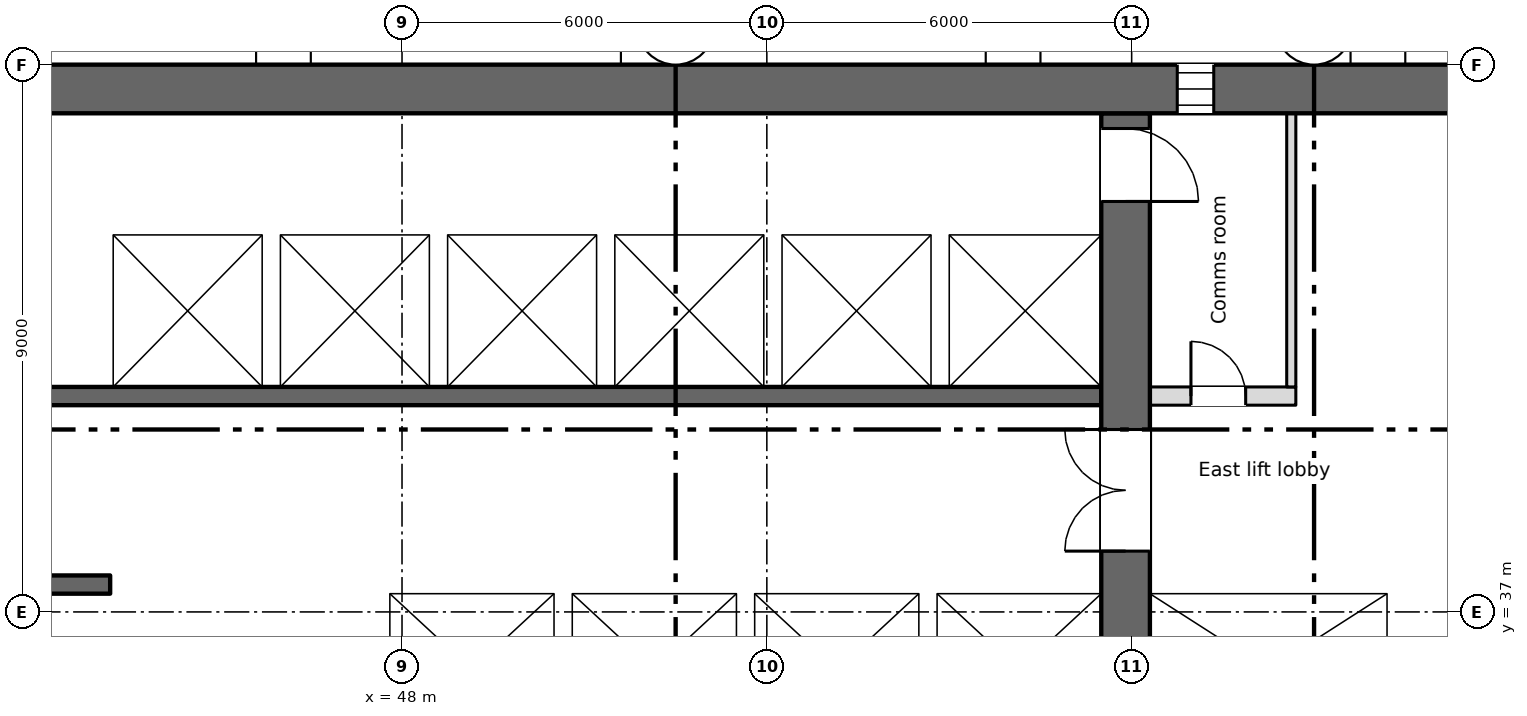
"""IFC4 building model, lengths in metres.
Left out: names, types, materials, properties, quantities, classifications, styles, units other than length and angle.
Written with IfcOpenShell. Run it as: python <this file> out.ifc"""

import sys

from ifc_helpers import new_model, si_unit, direction, frame, frame_2d, origin, place, context, subcontext, project, spatial, rectangle, extrude, element, fill, save


model = new_model("IFC4")
c1 = context("Model", 3, precision=1e-05, world=origin(), true_north=direction((0.0, 1.0)))
c2 = subcontext(c1, "Body", "Model", "MODEL_VIEW")
j1 = project(units=[si_unit("LENGTHUNIT", "METRE"), si_unit("PLANEANGLEUNIT", "RADIAN")], contexts=[c1])
p1 = place(None, origin())
s1 = spatial("IfcSite", under=j1, at=p1, CompositionType="ELEMENT")
p2 = place(p1, origin())
s2 = spatial("IfcBuilding", under=s1, at=p2, CompositionType="ELEMENT")
p3 = place(p2, frame((0.0, 0.0, 95.0)))
s3 = spatial("IfcBuildingStorey", under=s2, at=p3, CompositionType="ELEMENT", Elevation=95.0)
p4 = place(p3, frame((5.55, 45.6, 0.0), z_axis=(0.0, 0.0, 1.0), x_axis=(1.0, 0.0, 0.0)))
e1 = element("IfcWall", 1, at=p4, inside=s3, PredefinedType="SHEAR", context=c2, shape_type="SweptSolid", body=[
    extrude(rectangle(XDim=60.9, YDim=0.8, at=frame_2d((30.45, 0.0))), origin(), (0.0, 0.0, 1.0), 3.35),
])
p5 = place(p4, frame((1.2, 0.0, 0.6)))
e2 = element("IfcOpeningElement", 2, at=p5, cuts=e1, PredefinedType="OPENING", context=c2, shape_type="SweptSolid", body=[
    extrude(rectangle(XDim=0.6, YDim=2.4, at=frame_2d((0.3, 1.2))), frame((0.0, 0.41, 0.0), z_axis=(0.0, -1.0, 0.0), x_axis=(1.0, 0.0, 0.0)), (0.0, 0.0, 1.0), 0.82),
])
p6 = place(p4, frame((7.2, 0.0, 0.6)))
e3 = element("IfcOpeningElement", 3, at=p6, cuts=e1, PredefinedType="OPENING", context=c2, shape_type="SweptSolid", body=[
    extrude(rectangle(XDim=0.6, YDim=2.4, at=frame_2d((0.3, 1.2))), frame((0.0, 0.41, 0.0), z_axis=(0.0, -1.0, 0.0), x_axis=(1.0, 0.0, 0.0)), (0.0, 0.0, 1.0), 0.82),
])
p7 = place(p4, frame((55.2, 0.0, 0.6)))
e4 = element("IfcOpeningElement", 4, at=p7, cuts=e1, PredefinedType="OPENING", context=c2, shape_type="SweptSolid", body=[
    extrude(rectangle(XDim=0.6, YDim=2.4, at=frame_2d((0.3, 1.2))), frame((0.0, 0.41, 0.0), z_axis=(0.0, -1.0, 0.0), x_axis=(1.0, 0.0, 0.0)), (0.0, 0.0, 1.0), 0.82),
])
p8 = place(p3, frame((64.35, 34.8, 0.0), z_axis=(0.0, 0.0, 1.0), x_axis=(0.0, 1.0, 0.0)))
e5 = element("IfcWall", 5, at=p8, inside=s3, PredefinedType="SHEAR", context=c2, shape_type="SweptSolid", body=[
    extrude(rectangle(XDim=10.4, YDim=0.3, at=frame_2d((5.2, 0.0))), origin(), (0.0, 0.0, 1.0), 3.35),
])
p9 = place(p3, frame((59.9, 28.4, 0.0), z_axis=(0.0, 0.0, 1.0), x_axis=(0.0, 1.0, 0.0)))
e6 = element("IfcWall", 6, at=p9, inside=s3, PredefinedType="SHEAR", context=c2, shape_type="SweptSolid", body=[
    extrude(rectangle(XDim=16.8, YDim=0.8, at=frame_2d((8.4, 0.0))), origin(), (0.0, 0.0, 1.0), 3.35),
])
p10 = place(p9, frame((9.6, 0.0, 0.0)))
e7 = element("IfcOpeningElement", 7, at=p10, cuts=e6, PredefinedType="OPENING", context=c2, shape_type="SweptSolid", body=[
    extrude(rectangle(XDim=2.0, YDim=2.1, at=frame_2d((1.0, 1.05))), frame((0.0, 0.41, 0.0), z_axis=(0.0, -1.0, 0.0), x_axis=(1.0, 0.0, 0.0)), (0.0, 0.0, 1.0), 0.82),
])
p11 = place(p9, frame((15.35, 0.0, 0.0)))
e8 = element("IfcOpeningElement", 8, at=p11, cuts=e6, PredefinedType="OPENING", context=c2, shape_type="SweptSolid", body=[
    extrude(rectangle(XDim=1.2, YDim=2.1, at=frame_2d((0.6, 1.05))), frame((0.0, 0.41, 0.0), z_axis=(0.0, -1.0, 0.0), x_axis=(1.0, 0.0, 0.0)), (0.0, 0.0, 1.0), 0.82),
])
p12 = place(p3, frame((43.2, 37.45, 0.0), z_axis=(0.0, 0.0, 1.0), x_axis=(-1.0, 0.0, 0.0)))
e9 = element("IfcWall", 9, at=p12, inside=s3, PredefinedType="SHEAR", context=c2, shape_type="SweptSolid", body=[
    extrude(rectangle(XDim=8.4, YDim=0.3, at=frame_2d((4.2, 0.0))), origin(), (0.0, 0.0, 1.0), 3.35),
])
p13 = place(p12, frame((3.75, 0.0, 0.0)))
e10 = element("IfcOpeningElement", 10, at=p13, cuts=e9, PredefinedType="OPENING", context=c2, shape_type="SweptSolid", body=[
    extrude(rectangle(XDim=0.9, YDim=2.1, at=frame_2d((0.45, 1.05))), frame((0.0, 0.16, 0.0), z_axis=(0.0, -1.0, 0.0), x_axis=(1.0, 0.0, 0.0)), (0.0, 0.0, 1.0), 0.32),
])
p14 = place(p3, frame((47.3, 37.45, 0.0), z_axis=(0.0, 0.0, 1.0), x_axis=(1.0, 0.0, 0.0)))
e11 = element("IfcWall", 11, at=p14, inside=s3, PredefinedType="SHEAR", context=c2, shape_type="SweptSolid", body=[
    extrude(rectangle(XDim=12.2, YDim=0.3, at=frame_2d((6.1, 0.0))), origin(), (0.0, 0.0, 1.0), 3.35),
])
p15 = place(p14, frame((4.3, 0.0, 0.0)))
e12 = element("IfcOpeningElement", 12, at=p15, cuts=e11, PredefinedType="OPENING", context=c2, shape_type="SweptSolid", body=[
    extrude(rectangle(XDim=1.1, YDim=2.1, at=frame_2d((0.55, 1.05))), frame((0.0, 0.16, 0.0), z_axis=(0.0, -1.0, 0.0), x_axis=(1.0, 0.0, 0.0)), (0.0, 0.0, 1.0), 0.32),
])
p16 = place(p14, frame((7.3, 0.0, 0.0)))
e13 = element("IfcOpeningElement", 13, at=p16, cuts=e11, PredefinedType="OPENING", context=c2, shape_type="SweptSolid", body=[
    extrude(rectangle(XDim=1.1, YDim=2.1, at=frame_2d((0.55, 1.05))), frame((0.0, 0.16, 0.0), z_axis=(0.0, -1.0, 0.0), x_axis=(1.0, 0.0, 0.0)), (0.0, 0.0, 1.0), 0.32),
])
p17 = place(p14, frame((10.3, 0.0, 0.0)))
e14 = element("IfcOpeningElement", 14, at=p17, cuts=e11, PredefinedType="OPENING", context=c2, shape_type="SweptSolid", body=[
    extrude(rectangle(XDim=1.1, YDim=2.1, at=frame_2d((0.55, 1.05))), frame((0.0, 0.16, 0.0), z_axis=(0.0, -1.0, 0.0), x_axis=(1.0, 0.0, 0.0)), (0.0, 0.0, 1.0), 0.32),
])
p18 = place(p3, frame((60.3, 37.45, 0.0), z_axis=(0.0, 0.0, 1.0), x_axis=(1.0, 0.0, 0.0)))
e15 = element("IfcWall", 15, at=p18, inside=s3, PredefinedType="SHEAR", context=c2, shape_type="SweptSolid", body=[
    extrude(rectangle(XDim=3.9, YDim=0.3, at=frame_2d((1.95, 0.0))), origin(), (0.0, 0.0, 1.0), 3.35),
])
p19 = place(p18, frame((1.4, 0.0, 0.0)))
e16 = element("IfcOpeningElement", 16, at=p19, cuts=e15, PredefinedType="OPENING", context=c2, shape_type="SweptSolid", body=[
    extrude(rectangle(XDim=1.1, YDim=2.1, at=frame_2d((0.55, 1.05))), frame((0.0, 0.16, 0.0), z_axis=(0.0, -1.0, 0.0), x_axis=(1.0, 0.0, 0.0)), (0.0, 0.0, 1.0), 0.32),
])
p20 = place(p3, frame((43.05, 34.8, 0.0), z_axis=(0.0, 0.0, 1.0), x_axis=(0.0, 1.0, 0.0)))
e17 = element("IfcWall", 17, at=p20, inside=s3, PredefinedType="SHEAR", context=c2, shape_type="SweptSolid", body=[
    extrude(rectangle(XDim=2.5, YDim=0.3, at=frame_2d((1.25, 0.0))), origin(), (0.0, 0.0, 1.0), 3.35),
])
p21 = place(p3, frame((47.55, 34.8, 0.0), z_axis=(0.0, 0.0, 1.0), x_axis=(0.0, 1.0, 0.0)))
e18 = element("IfcWall", 18, at=p21, inside=s3, PredefinedType="SHEAR", context=c2, shape_type="SweptSolid", body=[
    extrude(rectangle(XDim=2.5, YDim=0.5, at=frame_2d((1.25, 0.0))), origin(), (0.0, 0.0, 1.0), 3.35),
])
p22 = place(p3, frame((50.65, 34.8, 0.0), z_axis=(0.0, 0.0, 1.0), x_axis=(0.0, 1.0, 0.0)))
e19 = element("IfcWall", 19, at=p22, inside=s3, PredefinedType="SHEAR", context=c2, shape_type="SweptSolid", body=[
    extrude(rectangle(XDim=2.5, YDim=0.3, at=frame_2d((1.25, 0.0))), origin(), (0.0, 0.0, 1.0), 3.35),
])
p23 = place(p3, frame((18.5, 40.55, 0.0), z_axis=(0.0, 0.0, 1.0), x_axis=(1.0, 0.0, 0.0)))
e20 = element("IfcWall", 20, at=p23, inside=s3, PredefinedType="SHEAR", context=c2, shape_type="SweptSolid", body=[
    extrude(rectangle(XDim=41.0, YDim=0.3, at=frame_2d((20.5, 0.0))), origin(), (0.0, 0.0, 1.0), 3.35),
])
p24 = place(p23, frame((15.9, 0.0, 0.0)))
e21 = element("IfcOpeningElement", 21, at=p24, cuts=e20, PredefinedType="OPENING", context=c2, shape_type="SweptSolid", body=[
    extrude(rectangle(XDim=0.9, YDim=2.1, at=frame_2d((0.45, 1.05))), frame((0.0, 0.16, 0.0), z_axis=(0.0, -1.0, 0.0), x_axis=(1.0, 0.0, 0.0)), (0.0, 0.0, 1.0), 0.32),
])
p25 = place(p23, frame((21.4, 0.0, 0.0)))
e22 = element("IfcOpeningElement", 22, at=p25, cuts=e20, PredefinedType="OPENING", context=c2, shape_type="SweptSolid", body=[
    extrude(rectangle(XDim=0.9, YDim=2.1, at=frame_2d((0.45, 1.05))), frame((0.0, 0.16, 0.0), z_axis=(0.0, -1.0, 0.0), x_axis=(1.0, 0.0, 0.0)), (0.0, 0.0, 1.0), 0.32),
])
p26 = place(p23, frame((6.175, 0.0, 0.0)))
e23 = element("IfcOpeningElement", 23, at=p26, cuts=e20, PredefinedType="OPENING", context=c2, shape_type="SweptSolid", body=[
    extrude(rectangle(XDim=1.1, YDim=2.1, at=frame_2d((0.55, 1.05))), frame((0.0, 0.16, 0.0), z_axis=(0.0, -1.0, 0.0), x_axis=(1.0, 0.0, 0.0)), (0.0, 0.0, 1.0), 0.32),
])
p27 = place(p23, frame((8.925, 0.0, 0.0)))
e24 = element("IfcOpeningElement", 24, at=p27, cuts=e20, PredefinedType="OPENING", context=c2, shape_type="SweptSolid", body=[
    extrude(rectangle(XDim=1.1, YDim=2.1, at=frame_2d((0.55, 1.05))), frame((0.0, 0.16, 0.0), z_axis=(0.0, -1.0, 0.0), x_axis=(1.0, 0.0, 0.0)), (0.0, 0.0, 1.0), 0.32),
])
p28 = place(p23, frame((11.675, 0.0, 0.0)))
e25 = element("IfcOpeningElement", 25, at=p28, cuts=e20, PredefinedType="OPENING", context=c2, shape_type="SweptSolid", body=[
    extrude(rectangle(XDim=1.1, YDim=2.1, at=frame_2d((0.55, 1.05))), frame((0.0, 0.16, 0.0), z_axis=(0.0, -1.0, 0.0), x_axis=(1.0, 0.0, 0.0)), (0.0, 0.0, 1.0), 0.32),
])
p29 = place(p23, frame((30.925, 0.0, 0.0)))
e26 = element("IfcOpeningElement", 26, at=p29, cuts=e20, PredefinedType="OPENING", context=c2, shape_type="SweptSolid", body=[
    extrude(rectangle(XDim=1.1, YDim=2.1, at=frame_2d((0.55, 1.05))), frame((0.0, 0.16, 0.0), z_axis=(0.0, -1.0, 0.0), x_axis=(1.0, 0.0, 0.0)), (0.0, 0.0, 1.0), 0.32),
])
p30 = place(p23, frame((33.675, 0.0, 0.0)))
e27 = element("IfcOpeningElement", 27, at=p30, cuts=e20, PredefinedType="OPENING", context=c2, shape_type="SweptSolid", body=[
    extrude(rectangle(XDim=1.1, YDim=2.1, at=frame_2d((0.55, 1.05))), frame((0.0, 0.16, 0.0), z_axis=(0.0, -1.0, 0.0), x_axis=(1.0, 0.0, 0.0)), (0.0, 0.0, 1.0), 0.32),
])
p31 = place(p23, frame((36.375, 0.0, 0.0)))
e28 = element("IfcOpeningElement", 28, at=p31, cuts=e20, PredefinedType="OPENING", context=c2, shape_type="SweptSolid", body=[
    extrude(rectangle(XDim=1.2, YDim=2.1, at=frame_2d((0.6, 1.05))), frame((0.0, 0.16, 0.0), z_axis=(0.0, -1.0, 0.0), x_axis=(1.0, 0.0, 0.0)), (0.0, 0.0, 1.0), 0.32),
])
p32 = place(p23, frame((39.15, 0.0, 0.0)))
e29 = element("IfcOpeningElement", 29, at=p32, cuts=e20, PredefinedType="OPENING", context=c2, shape_type="SweptSolid", body=[
    extrude(rectangle(XDim=1.2, YDim=2.1, at=frame_2d((0.6, 1.05))), frame((0.0, 0.16, 0.0), z_axis=(0.0, -1.0, 0.0), x_axis=(1.0, 0.0, 0.0)), (0.0, 0.0, 1.0), 0.32),
])
p33 = place(p3, frame((18.5, 43.35, 0.0), z_axis=(0.0, 0.0, 1.0), x_axis=(1.0, 0.0, 0.0)))
e30 = element("IfcWall", 30, at=p33, inside=s3, PredefinedType="SHEAR", context=c2, shape_type="SweptSolid", body=[
    extrude(rectangle(XDim=41.0, YDim=0.3, at=frame_2d((20.5, 0.0))), origin(), (0.0, 0.0, 1.0), 3.35),
])
p34 = place(p3, frame((60.3, 40.55, 0.0), z_axis=(0.0, 0.0, 1.0), x_axis=(1.0, 0.0, 0.0)))
e31 = element("IfcWall", 31, at=p34, inside=s3, PredefinedType="PARTITIONING", context=c2, shape_type="SweptSolid", body=[
    extrude(rectangle(XDim=2.4, YDim=0.3, at=frame_2d((1.2, 0.0))), origin(), (0.0, 0.0, 1.0), 3.35),
])
p35 = place(p34, frame((0.675, 0.0, 0.0)))
e32 = element("IfcOpeningElement", 32, at=p35, cuts=e31, PredefinedType="OPENING", context=c2, shape_type="SweptSolid", body=[
    extrude(rectangle(XDim=0.9, YDim=2.1, at=frame_2d((0.45, 1.05))), frame((0.0, 0.16, 0.0), z_axis=(0.0, -1.0, 0.0), x_axis=(1.0, 0.0, 0.0)), (0.0, 0.0, 1.0), 0.32),
])
for number, where, z_axis, x_axis in (
    (33, (53.65, 34.8, 0.0), (0.0, 0.0, 1.0), (0.0, 1.0, 0.0)),
    (34, (56.65, 34.8, 0.0), (0.0, 0.0, 1.0), (0.0, 1.0, 0.0)),
    (35, (43.1, 40.7, 0.0), (0.0, 0.0, 1.0), (0.0, 1.0, 0.0)),
    (36, (45.85, 40.7, 0.0), (0.0, 0.0, 1.0), (0.0, 1.0, 0.0)),
    (37, (48.6, 40.7, 0.0), (0.0, 0.0, 1.0), (0.0, 1.0, 0.0)),
    (38, (51.35, 40.7, 0.0), (0.0, 0.0, 1.0), (0.0, 1.0, 0.0)),
    (39, (54.1, 40.7, 0.0), (0.0, 0.0, 1.0), (0.0, 1.0, 0.0)),
    (40, (56.85, 40.7, 0.0), (0.0, 0.0, 1.0), (0.0, 1.0, 0.0)),
):
    element("IfcWall", number, at=place(p3, frame(where, z_axis=z_axis, x_axis=x_axis)), inside=s3, PredefinedType="SHEAR", context=c2, shape_type="SweptSolid", body=[
        extrude(rectangle(XDim=2.5, YDim=0.3, at=frame_2d((1.25, 0.0))), origin(), (0.0, 0.0, 1.0), 3.35),
    ])
p36 = place(p3, frame((62.625, 40.7, 0.0), z_axis=(0.0, 0.0, 1.0), x_axis=(0.0, 1.0, 0.0)))
e41 = element("IfcWall", 41, at=p36, inside=s3, PredefinedType="PARTITIONING", context=c2, shape_type="SweptSolid", body=[
    extrude(rectangle(XDim=4.5, YDim=0.15, at=frame_2d((2.25, 0.0))), origin(), (0.0, 0.0, 1.0), 3.35),
])
p37 = place(p7, origin())
e42 = element("IfcWindow", 42, at=p37, inside=s3, PartitioningType="SINGLE_PANEL", PredefinedType="WINDOW", context=c2, shape_type="SweptSolid", body=[
    extrude(rectangle(XDim=0.6, YDim=2.4, at=frame_2d((0.3, 1.2))), frame((0.0, 0.03, 0.0), z_axis=(0.0, -1.0, 0.0), x_axis=(1.0, 0.0, 0.0)), (0.0, 0.0, 1.0), 0.06),
])
fill(e4, e42)
p38 = place(p35, origin())
e43 = element("IfcDoor", 43, at=p38, inside=s3, OperationType="SINGLE_SWING_LEFT", PredefinedType="DOOR", context=c2, shape_type="SweptSolid", body=[
    extrude(rectangle(XDim=0.9, YDim=2.1, at=frame_2d((0.45, 1.05))), frame((0.0, 0.025, 0.0), z_axis=(0.0, -1.0, 0.0), x_axis=(1.0, 0.0, 0.0)), (0.0, 0.0, 1.0), 0.05),
])
fill(e32, e43)
p39 = place(p15, origin())
e44 = element("IfcDoor", 44, at=p39, inside=s3, OperationType="SLIDING_TO_LEFT", PredefinedType="DOOR", context=c2, shape_type="SweptSolid", body=[
    extrude(rectangle(XDim=1.1, YDim=2.1, at=frame_2d((0.55, 1.05))), frame((0.0, 0.025, 0.0), z_axis=(0.0, -1.0, 0.0), x_axis=(1.0, 0.0, 0.0)), (0.0, 0.0, 1.0), 0.05),
])
fill(e12, e44)
p40 = place(p16, origin())
e45 = element("IfcDoor", 45, at=p40, inside=s3, OperationType="SLIDING_TO_LEFT", PredefinedType="DOOR", context=c2, shape_type="SweptSolid", body=[
    extrude(rectangle(XDim=1.1, YDim=2.1, at=frame_2d((0.55, 1.05))), frame((0.0, 0.025, 0.0), z_axis=(0.0, -1.0, 0.0), x_axis=(1.0, 0.0, 0.0)), (0.0, 0.0, 1.0), 0.05),
])
fill(e13, e45)
p41 = place(p17, origin())
e46 = element("IfcDoor", 46, at=p41, inside=s3, OperationType="SLIDING_TO_LEFT", PredefinedType="DOOR", context=c2, shape_type="SweptSolid", body=[
    extrude(rectangle(XDim=1.1, YDim=2.1, at=frame_2d((0.55, 1.05))), frame((0.0, 0.025, 0.0), z_axis=(0.0, -1.0, 0.0), x_axis=(1.0, 0.0, 0.0)), (0.0, 0.0, 1.0), 0.05),
])
fill(e14, e46)
p42 = place(p29, origin())
e47 = element("IfcDoor", 47, at=p42, inside=s3, OperationType="SLIDING_TO_LEFT", PredefinedType="DOOR", context=c2, shape_type="SweptSolid", body=[
    extrude(rectangle(XDim=1.1, YDim=2.1, at=frame_2d((0.55, 1.05))), frame((0.0, 0.025, 0.0), z_axis=(0.0, -1.0, 0.0), x_axis=(1.0, 0.0, 0.0)), (0.0, 0.0, 1.0), 0.05),
])
fill(e26, e47)
p43 = place(p30, origin())
e48 = element("IfcDoor", 48, at=p43, inside=s3, OperationType="SLIDING_TO_LEFT", PredefinedType="DOOR", context=c2, shape_type="SweptSolid", body=[
    extrude(rectangle(XDim=1.1, YDim=2.1, at=frame_2d((0.55, 1.05))), frame((0.0, 0.025, 0.0), z_axis=(0.0, -1.0, 0.0), x_axis=(1.0, 0.0, 0.0)), (0.0, 0.0, 1.0), 0.05),
])
fill(e27, e48)
p44 = place(p31, origin())
e49 = element("IfcDoor", 49, at=p44, inside=s3, OperationType="SLIDING_TO_LEFT", PredefinedType="DOOR", context=c2, shape_type="SweptSolid", body=[
    extrude(rectangle(XDim=1.2, YDim=2.1, at=frame_2d((0.6, 1.05))), frame((0.0, 0.025, 0.0), z_axis=(0.0, -1.0, 0.0), x_axis=(1.0, 0.0, 0.0)), (0.0, 0.0, 1.0), 0.05),
])
fill(e28, e49)
p45 = place(p32, origin())
e50 = element("IfcDoor", 50, at=p45, inside=s3, OperationType="SLIDING_TO_LEFT", PredefinedType="DOOR", context=c2, shape_type="SweptSolid", body=[
    extrude(rectangle(XDim=1.2, YDim=2.1, at=frame_2d((0.6, 1.05))), frame((0.0, 0.025, 0.0), z_axis=(0.0, -1.0, 0.0), x_axis=(1.0, 0.0, 0.0)), (0.0, 0.0, 1.0), 0.05),
])
fill(e29, e50)
p46 = place(p19, origin())
e51 = element("IfcDoor", 51, at=p46, inside=s3, OperationType="SLIDING_TO_LEFT", PredefinedType="DOOR", context=c2, shape_type="SweptSolid", body=[
    extrude(rectangle(XDim=1.1, YDim=2.1, at=frame_2d((0.55, 1.05))), frame((0.0, 0.025, 0.0), z_axis=(0.0, -1.0, 0.0), x_axis=(1.0, 0.0, 0.0)), (0.0, 0.0, 1.0), 0.05),
])
fill(e16, e51)
p47 = place(p10, origin())
e52 = element("IfcDoor", 52, at=p47, inside=s3, OperationType="DOUBLE_DOOR_SINGLE_SWING", PredefinedType="DOOR", context=c2, shape_type="SweptSolid", body=[
    extrude(rectangle(XDim=2.0, YDim=2.1, at=frame_2d((1.0, 1.05))), frame((0.0, 0.025, 0.0), z_axis=(0.0, -1.0, 0.0), x_axis=(1.0, 0.0, 0.0)), (0.0, 0.0, 1.0), 0.05),
])
fill(e7, e52)
p48 = place(p11, origin())
e53 = element("IfcDoor", 53, at=p48, inside=s3, OperationType="SINGLE_SWING_LEFT", PredefinedType="DOOR", context=c2, shape_type="SweptSolid", body=[
    extrude(rectangle(XDim=1.2, YDim=2.1, at=frame_2d((0.6, 1.05))), frame((0.0, 0.025, 0.0), z_axis=(0.0, -1.0, 0.0), x_axis=(1.0, 0.0, 0.0)), (0.0, 0.0, 1.0), 0.05),
])
fill(e8, e53)
save(model, sys.argv[1])
